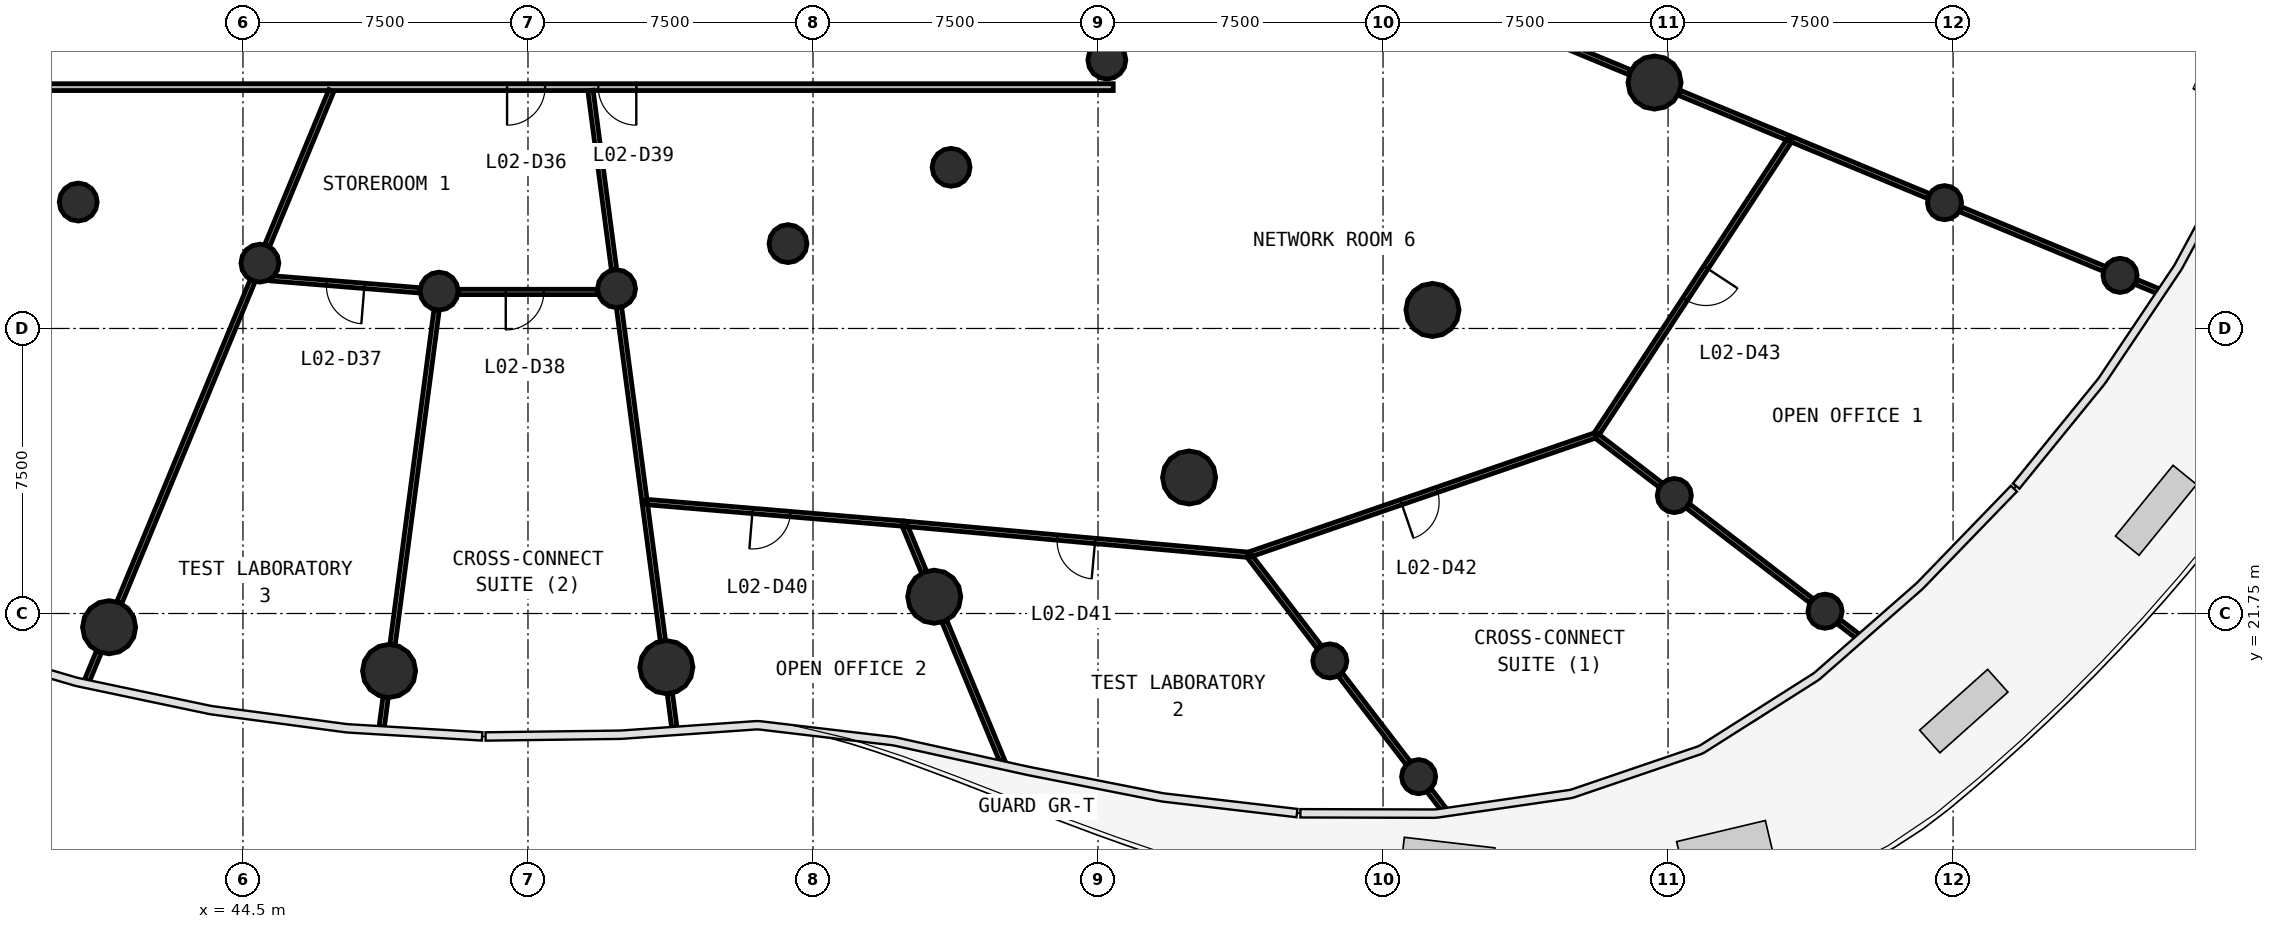
"""IFC4 building model, lengths in metres.
Left out: names, types, materials, properties, quantities, classifications, styles, units other than length and angle.
Written with IfcOpenShell. Run it as: python <this file> out.ifc"""

import sys

from ifc_helpers import new_model, si_unit, direction, frame, frame_2d, origin, origin_2d, place, context, subcontext, project, spatial, rectangle, circle, extrude, source, transform, mapped, element, fill, save


model = new_model("IFC4")
c1 = context("Model", 3, precision=1e-05, world=origin(), true_north=direction((0.0, 1.0)))
c2 = subcontext(c1, "Body", "Model", "MODEL_VIEW")
j1 = project(units=[si_unit("LENGTHUNIT", "METRE"), si_unit("PLANEANGLEUNIT", "RADIAN")], contexts=[c1])
p1 = place(None, origin())
s1 = spatial("IfcSite", under=j1, at=p1, CompositionType="ELEMENT")
p2 = place(p1, origin())
s2 = spatial("IfcBuilding", under=s1, at=p2, CompositionType="ELEMENT")
p3 = place(p2, frame((0.0, 0.0, 9.4)))
s3 = spatial("IfcBuildingStorey", under=s2, at=p3, CompositionType="ELEMENT", Elevation=9.4)
m1 = source(origin(), c2, "Body", "SweptSolid", [
    extrude(circle(Radius=0.7, at=origin_2d()), origin(), (0.0, 0.0, 1.0), 4.4),
])
for number, where, z_axis, x_axis in (
    (1, (40.977, 21.389, 0.0), (0.0, 0.0, 1.0), (1.0, 0.0, 0.0)),
    (2, (48.345, 20.239, 0.0), (0.0, 0.0, 1.0), (1.0, 0.0, 0.0)),
    (3, (55.642, 20.339, 0.0), (0.0, 0.0, 1.0), (1.0, 0.0, 0.0)),
    (4, (62.69, 22.191, 0.0), (0.0, 0.0, 1.0), (1.0, 0.0, 0.0)),
    (5, (69.396, 25.328, 0.0), (0.0, 0.0, 1.0), (1.0, 0.0, 0.0)),
    (6, (75.801, 29.737, 0.0), (0.0, 0.0, 1.0), (1.0, 0.0, 0.0)),
    (7, (81.645, 35.721, 0.0), (0.0, 0.0, 1.0), (1.0, 0.0, 0.0)),
):
    element("IfcColumn", number, at=place(p3, frame(where, z_axis=z_axis, x_axis=x_axis)), inside=s3, PredefinedType="COLUMN", context=c2, shape_type="MappedRepresentation", body=[
        mapped(m1, transform((0.0, 0.0, 0.0), scale=1.0)),
    ])
m2 = source(origin(), c2, "Body", "SweptSolid", [
    extrude(circle(Radius=0.5, at=origin_2d()), origin(), (0.0, 0.0, 1.0), 4.4),
])
for number, where, z_axis, x_axis in (
    (8, (40.165, 32.576, 0.0), (0.0, 0.0, 1.0), (1.0, 0.0, 0.0)),
    (9, (44.945, 30.969, 0.0), (0.0, 0.0, 1.0), (1.0, 0.0, 0.0)),
    (10, (49.661, 30.233, 0.0), (0.0, 0.0, 1.0), (1.0, 0.0, 0.0)),
    (11, (54.331, 30.297, 0.0), (0.0, 0.0, 1.0), (1.0, 0.0, 0.0)),
    (12, (58.842, 31.482, 0.0), (0.0, 0.0, 1.0), (1.0, 0.0, 0.0)),
    (13, (63.134, 33.49, 0.0), (0.0, 0.0, 1.0), (1.0, 0.0, 0.0)),
    (14, (67.232, 36.312, 0.0), (0.0, 0.0, 1.0), (1.0, 0.0, 0.0)),
):
    element("IfcColumn", number, at=place(p3, frame(where, z_axis=z_axis, x_axis=x_axis)), inside=s3, PredefinedType="COLUMN", context=c2, shape_type="MappedRepresentation", body=[
        mapped(m2, transform((0.0, 0.0, 0.0), scale=1.0)),
    ])
m3 = source(origin(), c2, "Body", "SweptSolid", [
    extrude(circle(Radius=0.45, at=origin_2d()), origin(), (0.0, 0.0, 1.0), 3.95),
])
for number, where, z_axis, x_axis in (
    (15, (75.436, 17.457, 0.0), (0.0, 0.0, 1.0), (1.0, 0.0, 0.0)),
    (16, (86.131, 21.81, 0.0), (0.0, 0.0, 1.0), (1.0, 0.0, 0.0)),
    (17, (93.894, 30.647, 0.0), (0.0, 0.0, 1.0), (1.0, 0.0, 0.0)),
):
    element("IfcColumn", number, at=place(p3, frame(where, z_axis=z_axis, x_axis=x_axis)), inside=s3, PredefinedType="COLUMN", context=c2, shape_type="MappedRepresentation", body=[
        mapped(m3, transform((0.0, 0.0, 0.0), scale=1.0)),
    ])
m4 = source(origin(), c2, "Body", "SweptSolid", [
    extrude(circle(Radius=0.45, at=origin_2d()), origin(), (0.0, 0.0, 1.0), 4.4),
])
for number, where, z_axis, x_axis in (
    (18, (73.1, 20.503, 0.0), (0.0, 0.0, 1.0), (1.0, 0.0, 0.0)),
    (19, (82.165, 24.854, 0.0), (0.0, 0.0, 1.0), (1.0, 0.0, 0.0)),
    (20, (89.275, 32.56, 0.0), (0.0, 0.0, 1.0), (1.0, 0.0, 0.0)),
):
    element("IfcColumn", number, at=place(p3, frame(where, z_axis=z_axis, x_axis=x_axis)), inside=s3, PredefinedType="COLUMN", context=c2, shape_type="MappedRepresentation", body=[
        mapped(m4, transform((0.0, 0.0, 0.0), scale=1.0)),
    ])
p4 = place(p3, frame((67.4, 35.6, 0.0), z_axis=(0.0, 0.0, 1.0), x_axis=(-1.0, 0.0, 0.0)))
e21 = element("IfcWall", 21, at=p4, inside=s3, PredefinedType="PARTITIONING", context=c2, shape_type="SweptSolid", body=[
    extrude(rectangle(XDim=30.8, YDim=0.18, at=frame_2d((15.4, 0.0))), origin(), (0.0, 0.0, 1.0), 3.15),
])
p5 = place(p4, frame((14.95, 0.0, 0.0)))
e22 = element("IfcOpeningElement", 22, at=p5, cuts=e21, PredefinedType="OPENING", context=c2, shape_type="SweptSolid", body=[
    extrude(rectangle(XDim=1.0, YDim=2.1, at=frame_2d((0.5, 1.05))), frame((0.0, 0.1, 0.0), z_axis=(0.0, -1.0, 0.0), x_axis=(1.0, 0.0, 0.0)), (0.0, 0.0, 1.0), 0.2),
])
p6 = place(p4, frame((12.55, 0.0, 0.0)))
e23 = element("IfcOpeningElement", 23, at=p6, cuts=e21, PredefinedType="OPENING", context=c2, shape_type="SweptSolid", body=[
    extrude(rectangle(XDim=1.0, YDim=2.1, at=frame_2d((0.5, 1.05))), frame((0.0, 0.1, 0.0), z_axis=(0.0, -1.0, 0.0), x_axis=(1.0, 0.0, 0.0)), (0.0, 0.0, 1.0), 0.2),
])
p7 = place(p3, frame((80.097, 26.44, 0.0), z_axis=(0.0, 0.0, 1.0), x_axis=(-0.945541154245, -0.325502573922, 0.0)))
e24 = element("IfcWall", 24, at=p7, inside=s3, PredefinedType="PARTITIONING", context=c2, shape_type="SweptSolid", body=[
    extrude(rectangle(XDim=9.666, YDim=0.14, at=frame_2d((4.833, 0.0))), origin(), (0.0, 0.0, 1.0), 3.15),
])
p8 = place(p7, frame((4.416, 0.0, 0.0)))
e25 = element("IfcOpeningElement", 25, at=p8, cuts=e24, PredefinedType="OPENING", context=c2, shape_type="SweptSolid", body=[
    extrude(rectangle(XDim=1.0, YDim=2.1, at=frame_2d((0.5, 1.05))), frame((0.0, 0.08, 0.0), z_axis=(0.0, -1.0, 0.0), x_axis=(1.0, 0.0, 0.0)), (0.0, 0.0, 1.0), 0.16),
])
p9 = place(p3, frame((85.219, 34.24, 0.0), z_axis=(0.0, 0.0, 1.0), x_axis=(-0.548956837057, -0.835850699018, 0.0)))
e26 = element("IfcWall", 26, at=p9, inside=s3, PredefinedType="PARTITIONING", context=c2, shape_type="SweptSolid", body=[
    extrude(rectangle(XDim=9.301, YDim=0.14, at=frame_2d((4.651, 0.0))), origin(), (0.0, 0.0, 1.0), 3.15),
])
p10 = place(p9, frame((4.051, 0.0, 0.0)))
e27 = element("IfcOpeningElement", 27, at=p10, cuts=e26, PredefinedType="OPENING", context=c2, shape_type="SweptSolid", body=[
    extrude(rectangle(XDim=1.0, YDim=2.1, at=frame_2d((0.5, 1.05))), frame((0.0, 0.08, 0.0), z_axis=(0.0, -1.0, 0.0), x_axis=(1.0, 0.0, 0.0)), (0.0, 0.0, 1.0), 0.16),
])
p11 = place(p3, frame((44.752, 30.502, 0.0), z_axis=(0.0, 0.0, 1.0), x_axis=(-0.382672728165, -0.923883966264, 0.0)))
e28 = element("IfcWall", 28, at=p11, inside=s3, PredefinedType="PARTITIONING", context=c2, shape_type="SweptSolid", body=[
    extrude(rectangle(XDim=9.16, YDim=0.14, at=frame_2d((4.58, 0.0))), origin(), (0.0, 0.0, 1.0), 3.15),
])
p12 = place(p3, frame((70.927, 23.297, 0.0), z_axis=(0.0, 0.0, 1.0), x_axis=(-0.995938530205, 0.090035793182, 0.0)))
e29 = element("IfcWall", 29, at=p12, inside=s3, PredefinedType="PARTITIONING", context=c2, shape_type="SweptSolid", body=[
    extrude(rectangle(XDim=9.07, YDim=0.14, at=frame_2d((4.535, 0.0))), origin(), (0.0, 0.0, 1.0), 3.15),
])
p13 = place(p12, frame((4.021, 0.0, 0.0)))
e30 = element("IfcOpeningElement", 30, at=p13, cuts=e29, PredefinedType="OPENING", context=c2, shape_type="SweptSolid", body=[
    extrude(rectangle(XDim=1.0, YDim=2.1, at=frame_2d((0.5, 1.05))), frame((0.0, 0.08, 0.0), z_axis=(0.0, -1.0, 0.0), x_axis=(1.0, 0.0, 0.0)), (0.0, 0.0, 1.0), 0.16),
])
p14 = place(p3, frame((49.595, 29.733, 0.0), z_axis=(0.0, 0.0, 1.0), x_axis=(-0.130521426482, -0.991445488783, 0.0)))
e31 = element("IfcWall", 31, at=p14, inside=s3, PredefinedType="PARTITIONING", context=c2, shape_type="SweptSolid", body=[
    extrude(rectangle(XDim=8.872, YDim=0.14, at=frame_2d((4.436, 0.0))), origin(), (0.0, 0.0, 1.0), 3.15),
])
p15 = place(p3, frame((61.864, 24.116, 0.0), z_axis=(0.0, 0.0, 1.0), x_axis=(-0.996481261198, 0.083815846237, 0.0)))
e32 = element("IfcWall", 32, at=p15, inside=s3, PredefinedType="PARTITIONING", context=c2, shape_type="SweptSolid", body=[
    extrude(rectangle(XDim=6.819, YDim=0.14, at=frame_2d((3.409, 0.0))), origin(), (0.0, 0.0, 1.0), 3.15),
])
p16 = place(p15, frame((2.969, 0.0, 0.0)))
e33 = element("IfcOpeningElement", 33, at=p16, cuts=e32, PredefinedType="OPENING", context=c2, shape_type="SweptSolid", body=[
    extrude(rectangle(XDim=1.0, YDim=2.1, at=frame_2d((0.5, 1.05))), frame((0.0, 0.08, 0.0), z_axis=(0.0, -1.0, 0.0), x_axis=(1.0, 0.0, 0.0)), (0.0, 0.0, 1.0), 0.16),
])
p17 = place(p3, frame((75.677, 38.192, 0.0), z_axis=(0.0, 0.0, 1.0), x_axis=(0.923874610175, -0.38269531572, 0.0)))
e34 = element("IfcWall", 34, at=p17, inside=s3, PredefinedType="PARTITIONING", context=c2, shape_type="SweptSolid", body=[
    extrude(rectangle(XDim=5.754, YDim=0.14, at=frame_2d((2.877, 0.0))), origin(), (0.0, 0.0, 1.0), 3.15),
])
p18 = place(p3, frame((54.396, 29.797, 0.0), z_axis=(0.0, 0.0, 1.0), x_axis=(0.130530944133, -0.991444235761, 0.0)))
e35 = element("IfcWall", 35, at=p18, inside=s3, PredefinedType="PARTITIONING", context=c2, shape_type="SweptSolid", body=[
    extrude(rectangle(XDim=5.123, YDim=0.14, at=frame_2d((2.562, 0.0))), origin(), (0.0, 0.0, 1.0), 3.15),
])
p19 = place(p3, frame((53.644, 35.51, 0.0), z_axis=(0.0, 0.0, 1.0), x_axis=(0.130548834981, -0.991441880135, 0.0)))
e36 = element("IfcWall", 36, at=p19, inside=s3, PredefinedType="PARTITIONING", context=c2, shape_type="SweptSolid", body=[
    extrude(rectangle(XDim=4.754, YDim=0.14, at=frame_2d((2.377, 0.0))), origin(), (0.0, 0.0, 1.0), 3.15),
])
p20 = place(p3, frame((46.826, 35.51, 0.0), z_axis=(0.0, 0.0, 1.0), x_axis=(-0.382672831764, -0.923883923353, 0.0)))
e37 = element("IfcWall", 37, at=p20, inside=s3, PredefinedType="PARTITIONING", context=c2, shape_type="SweptSolid", body=[
    extrude(rectangle(XDim=4.41, YDim=0.14, at=frame_2d((2.205, 0.0))), origin(), (0.0, 0.0, 1.0), 3.15),
])
p21 = place(p3, frame((82.525, 24.577, 0.0), z_axis=(0.0, 0.0, 1.0), x_axis=(0.793377694402, -0.608729688799, 0.0)))
e38 = element("IfcWall", 38, at=p21, inside=s3, PredefinedType="PARTITIONING", context=c2, shape_type="SweptSolid", body=[
    extrude(rectangle(XDim=4.091, YDim=0.14, at=frame_2d((2.045, 0.0))), origin(), (0.0, 0.0, 1.0), 3.15),
])
p22 = place(p3, frame((89.695, 32.386, 0.0), z_axis=(0.0, 0.0, 1.0), x_axis=(0.92386621601, -0.382715579661, 0.0)))
e39 = element("IfcWall", 39, at=p22, inside=s3, PredefinedType="PARTITIONING", context=c2, shape_type="SweptSolid", body=[
    extrude(rectangle(XDim=4.09, YDim=0.14, at=frame_2d((2.045, 0.0))), origin(), (0.0, 0.0, 1.0), 3.15),
])
p23 = place(p3, frame((62.96, 21.54, 0.0), z_axis=(0.0, 0.0, 1.0), x_axis=(0.382661550363, -0.92388859603, 0.0)))
e40 = element("IfcWall", 40, at=p23, inside=s3, PredefinedType="PARTITIONING", context=c2, shape_type="SweptSolid", body=[
    extrude(rectangle(XDim=3.968, YDim=0.14, at=frame_2d((1.984, 0.0))), origin(), (0.0, 0.0, 1.0), 3.15),
])
p24 = place(p3, frame((85.247, 34.229, 0.0), z_axis=(0.0, 0.0, 1.0), x_axis=(0.92387965154, -0.382683145003, 0.0)))
e41 = element("IfcWall", 41, at=p24, inside=s3, PredefinedType="PARTITIONING", context=c2, shape_type="SweptSolid", body=[
    extrude(rectangle(XDim=3.904, YDim=0.14, at=frame_2d((1.952, 0.0))), origin(), (0.0, 0.0, 1.0), 3.15),
])
p25 = place(p3, frame((49.157, 30.252, 0.0), z_axis=(0.0, 0.0, 1.0), x_axis=(-0.996710154567, 0.081048552007, 0.0)))
e42 = element("IfcWall", 42, at=p25, inside=s3, PredefinedType="PARTITIONING", context=c2, shape_type="SweptSolid", body=[
    extrude(rectangle(XDim=3.916, YDim=0.14, at=frame_2d((1.958, 0.0))), origin(), (0.0, 0.0, 1.0), 3.15),
])
p26 = place(p25, frame((1.466, 0.0, 0.0)))
e43 = element("IfcOpeningElement", 43, at=p26, cuts=e42, PredefinedType="OPENING", context=c2, shape_type="SweptSolid", body=[
    extrude(rectangle(XDim=1.0, YDim=2.1, at=frame_2d((0.5, 1.05))), frame((0.0, 0.08, 0.0), z_axis=(0.0, -1.0, 0.0), x_axis=(1.0, 0.0, 0.0)), (0.0, 0.0, 1.0), 0.16),
])
p27 = place(p3, frame((55.079, 24.617, 0.0), z_axis=(0.0, 0.0, 1.0), x_axis=(0.130498239391, -0.991448541033, 0.0)))
e44 = element("IfcWall", 44, at=p27, inside=s3, PredefinedType="PARTITIONING", context=c2, shape_type="SweptSolid", body=[
    extrude(rectangle(XDim=3.611, YDim=0.14, at=frame_2d((1.805, 0.0))), origin(), (0.0, 0.0, 1.0), 3.15),
])
p28 = place(p3, frame((53.833, 30.211, 0.0), z_axis=(0.0, 0.0, 1.0), x_axis=(-1.0, 0.0, 0.0)))
e45 = element("IfcWall", 45, at=p28, inside=s3, PredefinedType="PARTITIONING", context=c2, shape_type="SweptSolid", body=[
    extrude(rectangle(XDim=3.669, YDim=0.14, at=frame_2d((1.834, 0.0))), origin(), (0.0, 0.0, 1.0), 3.15),
])
p29 = place(p28, frame((1.419, 0.0, 0.0)))
e46 = element("IfcOpeningElement", 46, at=p29, cuts=e45, PredefinedType="OPENING", context=c2, shape_type="SweptSolid", body=[
    extrude(rectangle(XDim=1.0, YDim=2.1, at=frame_2d((0.5, 1.05))), frame((0.0, 0.08, 0.0), z_axis=(0.0, -1.0, 0.0), x_axis=(1.0, 0.0, 0.0)), (0.0, 0.0, 1.0), 0.16),
])
p30 = place(p3, frame((82.296, 35.451, 0.0), z_axis=(0.0, 0.0, 1.0), x_axis=(0.923889850499, -0.382658521591, 0.0)))
e47 = element("IfcWall", 47, at=p30, inside=s3, PredefinedType="PARTITIONING", context=c2, shape_type="SweptSolid", body=[
    extrude(rectangle(XDim=3.093, YDim=0.14, at=frame_2d((1.546, 0.0))), origin(), (0.0, 0.0, 1.0), 3.15),
])
p31 = place(p3, frame((71.002, 23.236, 0.0), z_axis=(0.0, 0.0, 1.0), x_axis=(0.608806836057, -0.793318496173, 0.0)))
e48 = element("IfcWall", 48, at=p31, inside=s3, PredefinedType="PARTITIONING", context=c2, shape_type="SweptSolid", body=[
    extrude(rectangle(XDim=2.99, YDim=0.14, at=frame_2d((1.495, 0.0))), origin(), (0.0, 0.0, 1.0), 3.15),
])
p32 = place(p3, frame((73.376, 20.142, 0.0), z_axis=(0.0, 0.0, 1.0), x_axis=(0.608763898154, -0.793351445643, 0.0)))
e49 = element("IfcWall", 49, at=p32, inside=s3, PredefinedType="PARTITIONING", context=c2, shape_type="SweptSolid", body=[
    extrude(rectangle(XDim=2.93, YDim=0.14, at=frame_2d((1.465, 0.0))), origin(), (0.0, 0.0, 1.0), 3.15),
])
p33 = place(p3, frame((80.121, 26.422, 0.0), z_axis=(0.0, 0.0, 1.0), x_axis=(0.793337757309, -0.608781736609, 0.0)))
e50 = element("IfcWall", 50, at=p33, inside=s3, PredefinedType="PARTITIONING", context=c2, shape_type="SweptSolid", body=[
    extrude(rectangle(XDim=2.122, YDim=0.14, at=frame_2d((1.061, 0.0))), origin(), (0.0, 0.0, 1.0), 3.15),
])
p34 = place(p3, frame((61.924, 24.041, 0.0), z_axis=(0.0, 0.0, 1.0), x_axis=(0.382595690084, -0.923915871673, 0.0)))
e51 = element("IfcWall", 51, at=p34, inside=s3, PredefinedType="PARTITIONING", context=c2, shape_type="SweptSolid", body=[
    extrude(rectangle(XDim=1.297, YDim=0.14, at=frame_2d((0.648, 0.0))), origin(), (0.0, 0.0, 1.0), 3.15),
])
p35 = place(p3, frame((55.734, 19.64, 0.0), z_axis=(0.0, 0.0, 1.0), x_axis=(0.13059675412, -0.991435569169, 0.0)))
e52 = element("IfcWall", 52, at=p35, inside=s3, PredefinedType="PARTITIONING", context=c2, shape_type="SweptSolid", body=[
    extrude(rectangle(XDim=0.888, YDim=0.14, at=frame_2d((0.444, 0.0))), origin(), (0.0, 0.0, 1.0), 3.15),
])
p36 = place(p3, frame((40.708, 20.737, 0.0), z_axis=(0.0, 0.0, 1.0), x_axis=(-0.382692107758, -0.923875938998, 0.0)))
e53 = element("IfcWall", 53, at=p36, inside=s3, PredefinedType="PARTITIONING", context=c2, shape_type="SweptSolid", body=[
    extrude(rectangle(XDim=0.802, YDim=0.14, at=frame_2d((0.401, 0.0))), origin(), (0.0, 0.0, 1.0), 3.15),
])
p37 = place(p3, frame((48.253, 19.54, 0.0), z_axis=(0.0, 0.0, 1.0), x_axis=(-0.130598952658, -0.991435279564, 0.0)))
e54 = element("IfcWall", 54, at=p37, inside=s3, PredefinedType="PARTITIONING", context=c2, shape_type="SweptSolid", body=[
    extrude(rectangle(XDim=0.787, YDim=0.14, at=frame_2d((0.394, 0.0))), origin(), (0.0, 0.0, 1.0), 3.15),
])
p38 = place(p3, frame((94.314, 30.473, 0.0), z_axis=(0.0, 0.0, 1.0), x_axis=(0.923861804277, -0.382726229306, 0.0)))
e55 = element("IfcWall", 55, at=p38, inside=s3, PredefinedType="PARTITIONING", context=c2, shape_type="SweptSolid", body=[
    extrude(rectangle(XDim=0.634, YDim=0.14, at=frame_2d((0.317, 0.0))), origin(), (0.0, 0.0, 1.0), 3.15),
])
p39 = place(p3, frame((86.492, 21.533, 0.0), z_axis=(0.0, 0.0, 1.0), x_axis=(0.793240017883, -0.608909085191, 0.0)))
e56 = element("IfcWall", 56, at=p39, inside=s3, PredefinedType="PARTITIONING", context=c2, shape_type="SweptSolid", body=[
    extrude(rectangle(XDim=0.633, YDim=0.14, at=frame_2d((0.316, 0.0))), origin(), (0.0, 0.0, 1.0), 3.15),
])
p40 = place(p3, frame((75.713, 17.097, 0.0), z_axis=(0.0, 0.0, 1.0), x_axis=(0.608865317956, -0.79327361269, 0.0)))
e57 = element("IfcWall", 57, at=p40, inside=s3, PredefinedType="PARTITIONING", context=c2, shape_type="SweptSolid", body=[
    extrude(rectangle(XDim=0.614, YDim=0.14, at=frame_2d((0.307, 0.0))), origin(), (0.0, 0.0, 1.0), 3.15),
])
m5 = source(origin(), c2, "Body", "SweptSolid", [
    extrude(rectangle(XDim=1.0, YDim=2.1, at=frame_2d((0.5, 1.05))), frame((0.0, 0.025, 0.0), z_axis=(0.0, -1.0, 0.0), x_axis=(1.0, 0.0, 0.0)), (0.0, 0.0, 1.0), 0.05),
])
p41 = place(p5, origin())
e58 = element("IfcDoor", 58, at=p41, inside=s3, OperationType="SINGLE_SWING_RIGHT", PredefinedType="DOOR", context=c2, shape_type="MappedRepresentation", body=[
    mapped(m5, transform((0.0, 0.0, 0.0), scale=1.0)),
])
fill(e22, e58)
p42 = place(p26, origin())
e59 = element("IfcDoor", 59, at=p42, inside=s3, OperationType="SINGLE_SWING_LEFT", PredefinedType="DOOR", context=c2, shape_type="MappedRepresentation", body=[
    mapped(m5, transform((0.0, 0.0, 0.0), scale=1.0)),
])
fill(e43, e59)
p43 = place(p29, origin())
e60 = element("IfcDoor", 60, at=p43, inside=s3, OperationType="SINGLE_SWING_RIGHT", PredefinedType="DOOR", context=c2, shape_type="MappedRepresentation", body=[
    mapped(m5, transform((0.0, 0.0, 0.0), scale=1.0)),
])
fill(e46, e60)
p44 = place(p6, origin())
e61 = element("IfcDoor", 61, at=p44, inside=s3, OperationType="SINGLE_SWING_LEFT", PredefinedType="DOOR", context=c2, shape_type="MappedRepresentation", body=[
    mapped(m5, transform((0.0, 0.0, 0.0), scale=1.0)),
])
fill(e23, e61)
p45 = place(p16, origin())
e62 = element("IfcDoor", 62, at=p45, inside=s3, OperationType="SINGLE_SWING_RIGHT", PredefinedType="DOOR", context=c2, shape_type="MappedRepresentation", body=[
    mapped(m5, transform((0.0, 0.0, 0.0), scale=1.0)),
])
fill(e33, e62)
p46 = place(p13, origin())
e63 = element("IfcDoor", 63, at=p46, inside=s3, OperationType="SINGLE_SWING_LEFT", PredefinedType="DOOR", context=c2, shape_type="MappedRepresentation", body=[
    mapped(m5, transform((0.0, 0.0, 0.0), scale=1.0)),
])
fill(e30, e63)
p47 = place(p8, origin())
e64 = element("IfcDoor", 64, at=p47, inside=s3, OperationType="SINGLE_SWING_RIGHT", PredefinedType="DOOR", context=c2, shape_type="MappedRepresentation", body=[
    mapped(m5, transform((0.0, 0.0, 0.0), scale=1.0)),
])
fill(e25, e64)
p48 = place(p10, origin())
e65 = element("IfcDoor", 65, at=p48, inside=s3, OperationType="SINGLE_SWING_LEFT", PredefinedType="DOOR", context=c2, shape_type="MappedRepresentation", body=[
    mapped(m5, transform((0.0, 0.0, 0.0), scale=1.0)),
])
fill(e27, e65)
save(model, sys.argv[1])
